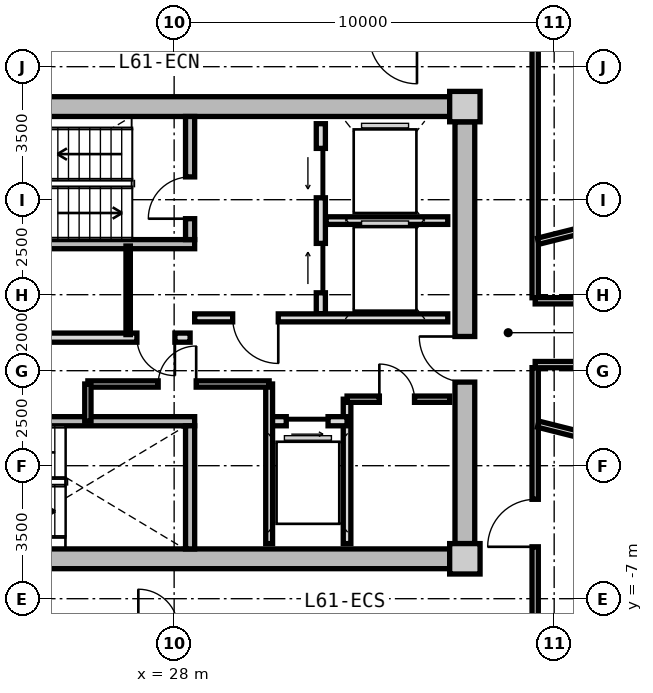
"""IFC4 building model, lengths in metres.
Left out: names, types, materials, properties, quantities, classifications, styles, units other than length and angle.
Written with IfcOpenShell. Run it as: python <this file> out.ifc"""

import sys

from ifc_helpers import new_model, si_unit, direction, frame, frame_2d, origin, origin_2d, place, context, subcontext, project, spatial, rectangle, extrude, source, transform, mapped, element, fill, save


model = new_model("IFC4")
c1 = context("Model", 3, precision=1e-05, world=origin(), true_north=direction((0.0, 1.0)))
c2 = subcontext(c1, "Body", "Model", "MODEL_VIEW")
j1 = project(units=[si_unit("LENGTHUNIT", "METRE"), si_unit("PLANEANGLEUNIT", "RADIAN")], contexts=[c1])
p1 = place(None, origin())
s1 = spatial("IfcSite", under=j1, at=p1, CompositionType="ELEMENT")
p2 = place(p1, origin())
s2 = spatial("IfcBuilding", under=s1, at=p2, CompositionType="ELEMENT")
p3 = place(p2, frame((0.0, 0.0, 196.75)))
s3 = spatial("IfcBuildingStorey", under=s2, at=p3, CompositionType="ELEMENT", Elevation=196.75)
m1 = source(origin(), c2, "Body", "SweptSolid", [
    extrude(rectangle(XDim=0.8, YDim=0.8, at=origin_2d()), origin(), (0.0, 0.0, 1.0), 3.05),
])
for number, where, z_axis, x_axis in (
    (1, (35.65, -5.95, 0.0), (0.0, 0.0, 1.0), (1.0, 0.0, 0.0)),
    (2, (35.65, 5.95, 0.0), (0.0, 0.0, 1.0), (1.0, 0.0, 0.0)),
):
    element("IfcColumn", number, at=place(p3, frame(where, z_axis=z_axis, x_axis=x_axis)), inside=s3, PredefinedType="COLUMN", context=c2, shape_type="MappedRepresentation", body=[
        mapped(m1, transform((0.0, 0.0, 0.0), x_axis=(1.0, 0.0, 0.0), y_axis=(0.0, 1.0, 0.0), z_axis=(0.0, 0.0, 1.0), scale=1.0)),
    ])
m2 = source(origin(), c2, "Body", "SweptSolid", [
    extrude(rectangle(XDim=14.5, YDim=0.52, at=frame_2d((7.25, 0.0))), origin(), (0.0, 0.0, 1.0), 2.76),
])
for number, where, z_axis, x_axis in (
    (3, (20.75, 5.95, 0.0), (0.0, 0.0, 1.0), (1.0, 0.0, 0.0)),
    (4, (35.25, -5.95, 0.0), (0.0, 0.0, 1.0), (-1.0, 0.0, 0.0)),
):
    element("IfcWall", number, at=place(p3, frame(where, z_axis=z_axis, x_axis=x_axis)), inside=s3, PredefinedType="SHEAR", context=c2, shape_type="MappedRepresentation", body=[
        mapped(m2, transform((0.0, 0.0, 0.0), x_axis=(1.0, 0.0, 0.0), y_axis=(0.0, 1.0, 0.0), z_axis=(0.0, 0.0, 1.0), scale=1.0)),
    ])
m3 = source(origin(), c2, "Body", "SweptSolid", [
    extrude(rectangle(XDim=11.1, YDim=0.52, at=frame_2d((5.55, 0.0))), origin(), (0.0, 0.0, 1.0), 2.76),
])
p4 = place(p3, frame((35.65, 5.55, 0.0), z_axis=(0.0, 0.0, 1.0), x_axis=(0.0, -1.0, 0.0)))
e5 = element("IfcWall", 5, at=p4, inside=s3, PredefinedType="SHEAR", context=c2, shape_type="MappedRepresentation", body=[
    mapped(m3, transform((0.0, 0.0, 0.0), x_axis=(1.0, 0.0, 0.0), y_axis=(0.0, 1.0, 0.0), z_axis=(0.0, 0.0, 1.0), scale=1.0)),
])
p5 = place(p4, frame((5.65, 0.0, 0.0)))
e6 = element("IfcOpeningElement", 6, at=p5, cuts=e5, PredefinedType="OPENING", context=c2, shape_type="SweptSolid", body=[
    extrude(rectangle(XDim=1.2, YDim=2.15, at=frame_2d((0.6, 1.075))), frame((0.0, 0.27, 0.0), z_axis=(0.0, -1.0, 0.0), x_axis=(1.0, 0.0, 0.0)), (0.0, 0.0, 1.0), 0.54),
])
m4 = source(origin(), c2, "Body", "SweptSolid", [
    extrude(rectangle(XDim=7.93, YDim=0.24, at=frame_2d((3.965, 0.0))), origin(), (0.0, 0.0, 1.0), 2.76),
])
p6 = place(p3, frame((20.61, 2.33, 0.0), z_axis=(0.0, 0.0, 1.0), x_axis=(1.0, 0.0, 0.0)))
e7 = element("IfcWall", 7, at=p6, inside=s3, PredefinedType="PARTITIONING", context=c2, shape_type="MappedRepresentation", body=[
    mapped(m4, transform((0.0, 0.0, 0.0), x_axis=(1.0, 0.0, 0.0), y_axis=(0.0, 1.0, 0.0), z_axis=(0.0, 0.0, 1.0), scale=1.0)),
])
m5 = source(origin(), c2, "Body", "SweptSolid", [
    extrude(rectangle(XDim=3.24, YDim=0.24, at=frame_2d((1.62, 0.0))), origin(), (0.0, 0.0, 1.0), 2.76),
])
p7 = place(p3, frame((28.42, 2.45, 0.0), z_axis=(0.0, 0.0, 1.0), x_axis=(0.0, 1.0, 0.0)))
e8 = element("IfcWall", 8, at=p7, inside=s3, PredefinedType="PARTITIONING", context=c2, shape_type="MappedRepresentation", body=[
    mapped(m5, transform((0.0, 0.0, 0.0), x_axis=(1.0, 0.0, 0.0), y_axis=(0.0, 1.0, 0.0), z_axis=(0.0, 0.0, 1.0), scale=1.0)),
])
p8 = place(p7, frame((0.55, 0.0, 0.0)))
e9 = element("IfcOpeningElement", 9, at=p8, cuts=e8, PredefinedType="OPENING", context=c2, shape_type="SweptSolid", body=[
    extrude(rectangle(XDim=1.1, YDim=2.15, at=frame_2d((0.55, 1.075))), frame((0.0, 0.13, 0.0), z_axis=(0.0, -1.0, 0.0), x_axis=(1.0, 0.0, 0.0)), (0.0, 0.0, 1.0), 0.26),
])
p9 = place(p3, frame((20.61, -2.33, 0.0), z_axis=(0.0, 0.0, 1.0), x_axis=(1.0, 0.0, 0.0)))
e10 = element("IfcWall", 10, at=p9, inside=s3, PredefinedType="PARTITIONING", context=c2, shape_type="MappedRepresentation", body=[
    mapped(m4, transform((0.0, 0.0, 0.0), x_axis=(1.0, 0.0, 0.0), y_axis=(0.0, 1.0, 0.0), z_axis=(0.0, 0.0, 1.0), scale=1.0)),
])
p10 = place(p9, frame((1.05, 0.0, 0.0)))
e11 = element("IfcOpeningElement", 11, at=p10, cuts=e10, PredefinedType="OPENING", context=c2, shape_type="SweptSolid", body=[
    extrude(rectangle(XDim=1.1, YDim=2.15, at=frame_2d((0.55, 1.075))), frame((0.0, 0.13, 0.0), z_axis=(0.0, -1.0, 0.0), x_axis=(1.0, 0.0, 0.0)), (0.0, 0.0, 1.0), 0.26),
])
p11 = place(p3, frame((28.42, -5.69, 0.0), z_axis=(0.0, 0.0, 1.0), x_axis=(0.0, 1.0, 0.0)))
e12 = element("IfcWall", 12, at=p11, inside=s3, PredefinedType="PARTITIONING", context=c2, shape_type="MappedRepresentation", body=[
    mapped(m5, transform((0.0, 0.0, 0.0), x_axis=(1.0, 0.0, 0.0), y_axis=(0.0, 1.0, 0.0), z_axis=(0.0, 0.0, 1.0), scale=1.0)),
])
m6 = source(origin(), c2, "Body", "SweptSolid", [
    extrude(rectangle(XDim=5.0, YDim=0.24, at=frame_2d((2.5, 0.0))), origin(), (0.0, 0.0, 1.0), 2.745),
])
p12 = place(p3, frame((31.86, 0.5, 0.0), z_axis=(0.0, 0.0, 1.0), x_axis=(0.0, 1.0, 0.0)))
e13 = element("IfcWall", 13, at=p12, inside=s3, PredefinedType="PARTITIONING", context=c2, shape_type="MappedRepresentation", body=[
    mapped(m6, transform((0.0, 0.0, 0.0), x_axis=(1.0, 0.0, 0.0), y_axis=(0.0, 1.0, 0.0), z_axis=(0.0, 0.0, 1.0), scale=1.0)),
])
p13 = place(p12, frame((3.05, 0.0, 0.0)))
e14 = element("IfcOpeningElement", 14, at=p13, cuts=e13, PredefinedType="OPENING", context=c2, shape_type="SweptSolid", body=[
    extrude(rectangle(XDim=1.3, YDim=2.2, at=frame_2d((0.65, 1.1))), frame((0.0, 0.13, 0.0), z_axis=(0.0, -1.0, 0.0), x_axis=(1.0, 0.0, 0.0)), (0.0, 0.0, 1.0), 0.26),
])
p14 = place(p12, frame((0.55, 0.0, 0.0)))
e15 = element("IfcOpeningElement", 15, at=p14, cuts=e13, PredefinedType="OPENING", context=c2, shape_type="SweptSolid", body=[
    extrude(rectangle(XDim=1.3, YDim=2.2, at=frame_2d((0.65, 1.1))), frame((0.0, 0.13, 0.0), z_axis=(0.0, -1.0, 0.0), x_axis=(1.0, 0.0, 0.0)), (0.0, 0.0, 1.0), 0.26),
])
m7 = source(origin(), c2, "Body", "SweptSolid", [
    extrude(rectangle(XDim=3.2, YDim=0.2, at=frame_2d((1.6, 0.0))), origin(), (0.0, 0.0, 1.0), 2.745),
])
p15 = place(p3, frame((32.0, 2.95, 0.0), z_axis=(0.0, 0.0, 1.0), x_axis=(1.0, 0.0, 0.0)))
e16 = element("IfcWall", 16, at=p15, inside=s3, PredefinedType="PARTITIONING", context=c2, shape_type="MappedRepresentation", body=[
    mapped(m7, transform((0.0, 0.0, 0.0), x_axis=(1.0, 0.0, 0.0), y_axis=(0.0, 1.0, 0.0), z_axis=(0.0, 0.0, 1.0), scale=1.0)),
])
m8 = source(origin(), c2, "Body", "SweptSolid", [
    extrude(rectangle(XDim=6.66, YDim=0.21, at=frame_2d((3.33, 0.0))), origin(), (0.0, 0.0, 1.0), 2.745),
])
p16 = place(p3, frame((28.54, 0.39, 0.0), z_axis=(0.0, 0.0, 1.0), x_axis=(1.0, 0.0, 0.0)))
e17 = element("IfcWall", 17, at=p16, inside=s3, PredefinedType="PARTITIONING", context=c2, shape_type="MappedRepresentation", body=[
    mapped(m8, transform((0.0, 0.0, 0.0), x_axis=(1.0, 0.0, 0.0), y_axis=(0.0, 1.0, 0.0), z_axis=(0.0, 0.0, 1.0), scale=1.0)),
])
p17 = place(p16, frame((1.0, 0.0, 0.0)))
e18 = element("IfcOpeningElement", 18, at=p17, cuts=e17, PredefinedType="OPENING", context=c2, shape_type="SweptSolid", body=[
    extrude(rectangle(XDim=1.2, YDim=2.15, at=frame_2d((0.6, 1.075))), frame((0.0, 0.115, 0.0), z_axis=(0.0, -1.0, 0.0), x_axis=(1.0, 0.0, 0.0)), (0.0, 0.0, 1.0), 0.23),
])
m9 = source(origin(), c2, "Body", "SweptSolid", [
    extrude(rectangle(XDim=7.62, YDim=0.24, at=frame_2d((3.81, 0.0))), origin(), (0.0, 0.0, 1.0), 2.745),
])
p18 = place(p3, frame((20.8, -0.13, 0.0), z_axis=(0.0, 0.0, 1.0), x_axis=(1.0, 0.0, 0.0)))
e19 = element("IfcWall", 19, at=p18, inside=s3, PredefinedType="PARTITIONING", context=c2, shape_type="MappedRepresentation", body=[
    mapped(m9, transform((0.0, 0.0, 0.0), x_axis=(1.0, 0.0, 0.0), y_axis=(0.0, 1.0, 0.0), z_axis=(0.0, 0.0, 1.0), scale=1.0)),
])
p19 = place(p18, frame((6.22, 0.0, 0.0)))
e20 = element("IfcOpeningElement", 20, at=p19, cuts=e19, PredefinedType="OPENING", context=c2, shape_type="SweptSolid", body=[
    extrude(rectangle(XDim=1.0, YDim=2.1, at=frame_2d((0.5, 1.05))), frame((0.0, 0.13, 0.0), z_axis=(0.0, -1.0, 0.0), x_axis=(1.0, 0.0, 0.0)), (0.0, 0.0, 1.0), 0.26),
])
p20 = place(p18, frame((2.4, 0.0, 0.0)))
e21 = element("IfcOpeningElement", 21, at=p20, cuts=e19, PredefinedType="OPENING", context=c2, shape_type="SweptSolid", body=[
    extrude(rectangle(XDim=1.0, YDim=2.1, at=frame_2d((0.5, 1.05))), frame((0.0, 0.13, 0.0), z_axis=(0.0, -1.0, 0.0), x_axis=(1.0, 0.0, 0.0)), (0.0, 0.0, 1.0), 0.26),
])
m10 = source(origin(), c2, "Body", "SweptSolid", [
    extrude(rectangle(XDim=2.33, YDim=0.115, at=frame_2d((1.165, 0.0))), origin(), (0.0, 0.0, 1.0), 2.745),
])
p21 = place(p3, frame((26.79, -0.05, 0.0), z_axis=(0.0, 0.0, 1.0), x_axis=(0.0, 1.0, 0.0)))
e22 = element("IfcWall", 22, at=p21, inside=s3, PredefinedType="PARTITIONING", context=c2, shape_type="MappedRepresentation", body=[
    mapped(m10, transform((0.0, 0.0, 0.0), x_axis=(1.0, 0.0, 0.0), y_axis=(0.0, 1.0, 0.0), z_axis=(0.0, 0.0, 1.0), scale=1.0)),
])
m11 = source(origin(), c2, "Body", "SweptSolid", [
    extrude(rectangle(XDim=3.8, YDim=0.2, at=frame_2d((1.9, 0.0))), origin(), (0.0, 0.0, 1.0), 2.745),
])
p22 = place(p3, frame((32.55, -5.55, 0.0), z_axis=(0.0, 0.0, 1.0), x_axis=(0.0, 1.0, 0.0)))
e23 = element("IfcWall", 23, at=p22, inside=s3, PredefinedType="PARTITIONING", context=c2, shape_type="MappedRepresentation", body=[
    mapped(m11, transform((0.0, 0.0, 0.0), x_axis=(1.0, 0.0, 0.0), y_axis=(0.0, 1.0, 0.0), z_axis=(0.0, 0.0, 1.0), scale=1.0)),
])
m12 = source(origin(), c2, "Body", "SweptSolid", [
    extrude(rectangle(XDim=2.05, YDim=0.24, at=frame_2d((1.025, 0.0))), origin(), (0.0, 0.0, 1.0), 2.745),
])
p23 = place(p3, frame((30.5, -2.33, 0.0), z_axis=(0.0, 0.0, 1.0), x_axis=(1.0, 0.0, 0.0)))
e24 = element("IfcWall", 24, at=p23, inside=s3, PredefinedType="PARTITIONING", context=c2, shape_type="MappedRepresentation", body=[
    mapped(m12, transform((0.0, 0.0, 0.0), x_axis=(1.0, 0.0, 0.0), y_axis=(0.0, 1.0, 0.0), z_axis=(0.0, 0.0, 1.0), scale=1.0)),
])
p24 = place(p23, frame((0.45, 0.0, 0.0)))
e25 = element("IfcOpeningElement", 25, at=p24, cuts=e24, PredefinedType="OPENING", context=c2, shape_type="SweptSolid", body=[
    extrude(rectangle(XDim=1.1, YDim=2.2, at=frame_2d((0.55, 1.1))), frame((0.0, 0.13, 0.0), z_axis=(0.0, -1.0, 0.0), x_axis=(1.0, 0.0, 0.0)), (0.0, 0.0, 1.0), 0.26),
])
m13 = source(origin(), c2, "Body", "SweptSolid", [
    extrude(rectangle(XDim=4.2, YDim=0.18, at=frame_2d((2.1, 0.0))), origin(), (0.0, 0.0, 1.0), 2.745),
])
p25 = place(p3, frame((30.5, -5.55, 0.0), z_axis=(0.0, 0.0, 1.0), x_axis=(0.0, 1.0, 0.0)))
e26 = element("IfcWall", 26, at=p25, inside=s3, PredefinedType="PARTITIONING", context=c2, shape_type="MappedRepresentation", body=[
    mapped(m13, transform((0.0, 0.0, 0.0), x_axis=(1.0, 0.0, 0.0), y_axis=(0.0, 1.0, 0.0), z_axis=(0.0, 0.0, 1.0), scale=1.0)),
])
m14 = source(origin(), c2, "Body", "SweptSolid", [
    extrude(rectangle(XDim=4.77, YDim=0.165, at=frame_2d((2.385, 0.0))), origin(), (0.0, 0.0, 1.0), 2.745),
])
p26 = place(p3, frame((25.73, -1.35, 0.0), z_axis=(0.0, 0.0, 1.0), x_axis=(1.0, 0.0, 0.0)))
e27 = element("IfcWall", 27, at=p26, inside=s3, PredefinedType="PARTITIONING", context=c2, shape_type="MappedRepresentation", body=[
    mapped(m14, transform((0.0, 0.0, 0.0), x_axis=(1.0, 0.0, 0.0), y_axis=(0.0, 1.0, 0.0), z_axis=(0.0, 0.0, 1.0), scale=1.0)),
])
p27 = place(p26, frame((1.85, 0.0, 0.0)))
e28 = element("IfcOpeningElement", 28, at=p27, cuts=e27, PredefinedType="OPENING", context=c2, shape_type="SweptSolid", body=[
    extrude(rectangle(XDim=1.0, YDim=2.1, at=frame_2d((0.5, 1.05))), frame((0.0, 0.093, 0.0), z_axis=(0.0, -1.0, 0.0), x_axis=(1.0, 0.0, 0.0)), (0.0, 0.0, 1.0), 0.185),
])
m15 = source(origin(), c2, "Body", "SweptSolid", [
    extrude(rectangle(XDim=0.98, YDim=0.165, at=frame_2d((0.49, 0.0))), origin(), (0.0, 0.0, 1.0), 2.745),
])
p28 = place(p3, frame((25.73, -2.33, 0.0), z_axis=(0.0, 0.0, 1.0), x_axis=(0.0, 1.0, 0.0)))
e29 = element("IfcWall", 29, at=p28, inside=s3, PredefinedType="PARTITIONING", context=c2, shape_type="MappedRepresentation", body=[
    mapped(m15, transform((0.0, 0.0, 0.0), x_axis=(1.0, 0.0, 0.0), y_axis=(0.0, 1.0, 0.0), z_axis=(0.0, 0.0, 1.0), scale=1.0)),
])
m16 = source(origin(), c2, "Body", "SweptSolid", [
    extrude(rectangle(XDim=2.7, YDim=0.165, at=frame_2d((1.35, 0.0))), origin(), (0.0, 0.0, 1.0), 2.745),
])
p29 = place(p3, frame((32.55, -1.75, 0.0), z_axis=(0.0, 0.0, 1.0), x_axis=(1.0, 0.0, 0.0)))
e30 = element("IfcWall", 30, at=p29, inside=s3, PredefinedType="PARTITIONING", context=c2, shape_type="MappedRepresentation", body=[
    mapped(m16, transform((0.0, 0.0, 0.0), x_axis=(1.0, 0.0, 0.0), y_axis=(0.0, 1.0, 0.0), z_axis=(0.0, 0.0, 1.0), scale=1.0)),
])
p30 = place(p29, frame((0.85, 0.0, 0.0)))
e31 = element("IfcOpeningElement", 31, at=p30, cuts=e30, PredefinedType="OPENING", context=c2, shape_type="SweptSolid", body=[
    extrude(rectangle(XDim=0.925, YDim=2.1, at=frame_2d((0.462, 1.05))), frame((0.0, 0.093, 0.0), z_axis=(0.0, -1.0, 0.0), x_axis=(1.0, 0.0, 0.0)), (0.0, 0.0, 1.0), 0.185),
])
m17 = source(origin(), c2, "Body", "SweptSolid", [
    extrude(rectangle(XDim=6.88, YDim=0.165, at=frame_2d((3.44, 0.0))), origin(), (0.0, 0.0, 1.0), 2.745),
])
p31 = place(p3, frame((37.5, 7.8, 0.0), z_axis=(0.0, 0.0, 1.0), x_axis=(0.0, -1.0, 0.0)))
e32 = element("IfcWall", 32, at=p31, inside=s3, PredefinedType="PARTITIONING", context=c2, shape_type="MappedRepresentation", body=[
    mapped(m17, transform((0.0, 0.0, 0.0), x_axis=(1.0, 0.0, 0.0), y_axis=(0.0, 1.0, 0.0), z_axis=(0.0, 0.0, 1.0), scale=1.0)),
])
p32 = place(p3, frame((37.5, -0.92, 0.0), z_axis=(0.0, 0.0, 1.0), x_axis=(0.0, -1.0, 0.0)))
e33 = element("IfcWall", 33, at=p32, inside=s3, PredefinedType="PARTITIONING", context=c2, shape_type="MappedRepresentation", body=[
    mapped(m17, transform((0.0, 0.0, 0.0), x_axis=(1.0, 0.0, 0.0), y_axis=(0.0, 1.0, 0.0), z_axis=(0.0, 0.0, 1.0), scale=1.0)),
])
p33 = place(p32, frame((3.464, 0.0, 0.0)))
e34 = element("IfcOpeningElement", 34, at=p33, cuts=e33, PredefinedType="OPENING", context=c2, shape_type="SweptSolid", body=[
    extrude(rectangle(XDim=1.25, YDim=2.2, at=frame_2d((0.625, 1.1))), frame((0.0, 0.093, 0.0), z_axis=(0.0, -1.0, 0.0), x_axis=(1.0, 0.0, 0.0)), (0.0, 0.0, 1.0), 0.185),
])
m18 = source(origin(), c2, "Body", "SweptSolid", [
    extrude(rectangle(XDim=6.157, YDim=0.165, at=frame_2d((3.079, 0.0))), origin(), (0.0, 0.0, 1.0), 2.345),
])
for number, where, z_axis, x_axis in (
    (35, (37.58, -2.407, 0.0), (0.0, 0.0, 1.0), (0.97, -0.244, 0.0)),
    (36, (37.58, 2.407, 0.0), (0.0, 0.0, 1.0), (0.97, 0.244, 0.0)),
):
    element("IfcWall", number, at=place(p3, frame(where, z_axis=z_axis, x_axis=x_axis)), inside=s3, PredefinedType="PARTITIONING", context=c2, shape_type="MappedRepresentation", body=[
        mapped(m18, transform((0.0, 0.0, 0.0), x_axis=(1.0, 0.0, 0.0), y_axis=(0.0, 1.0, 0.0), z_axis=(0.0, 0.0, 1.0), scale=1.0)),
    ])
m19 = source(origin(), c2, "Body", "SweptSolid", [
    extrude(rectangle(XDim=6.101, YDim=0.165, at=frame_2d((3.051, 0.0))), origin(), (0.0, 0.0, 1.0), 2.745),
])
p34 = place(p3, frame((37.5, 0.84, 0.0), z_axis=(0.0, 0.0, 1.0), x_axis=(1.0, 0.0, 0.0)))
e37 = element("IfcWall", 37, at=p34, inside=s3, PredefinedType="PARTITIONING", context=c2, shape_type="MappedRepresentation", body=[
    mapped(m19, transform((0.0, 0.0, 0.0), x_axis=(1.0, 0.0, 0.0), y_axis=(0.0, 1.0, 0.0), z_axis=(0.0, 0.0, 1.0), scale=1.0)),
])
p35 = place(p34, frame((2.576, 0.0, 0.0)))
e38 = element("IfcOpeningElement", 38, at=p35, cuts=e37, PredefinedType="OPENING", context=c2, shape_type="SweptSolid", body=[
    extrude(rectangle(XDim=0.95, YDim=2.1, at=frame_2d((0.475, 1.05))), frame((0.0, 0.093, 0.0), z_axis=(0.0, -1.0, 0.0), x_axis=(1.0, 0.0, 0.0)), (0.0, 0.0, 1.0), 0.185),
])
p36 = place(p3, frame((43.601, -0.84, 0.0), z_axis=(0.0, 0.0, 1.0), x_axis=(-1.0, 0.0, 0.0)))
e39 = element("IfcWall", 39, at=p36, inside=s3, PredefinedType="PARTITIONING", context=c2, shape_type="MappedRepresentation", body=[
    mapped(m19, transform((0.0, 0.0, 0.0), x_axis=(1.0, 0.0, 0.0), y_axis=(0.0, 1.0, 0.0), z_axis=(0.0, 0.0, 1.0), scale=1.0)),
])
p37 = place(p36, frame((2.576, 0.0, 0.0)))
e40 = element("IfcOpeningElement", 40, at=p37, cuts=e39, PredefinedType="OPENING", context=c2, shape_type="SweptSolid", body=[
    extrude(rectangle(XDim=0.95, YDim=2.1, at=frame_2d((0.475, 1.05))), frame((0.0, 0.093, 0.0), z_axis=(0.0, -1.0, 0.0), x_axis=(1.0, 0.0, 0.0)), (0.0, 0.0, 1.0), 0.185),
])
m20 = source(origin(), c2, "Body", "SweptSolid", [
    extrude(rectangle(XDim=1.1, YDim=2.15, at=frame_2d((0.55, 1.075))), frame((0.0, 0.025, 0.0), z_axis=(0.0, -1.0, 0.0), x_axis=(1.0, 0.0, 0.0)), (0.0, 0.0, 1.0), 0.05),
])
p38 = place(p8, origin())
e41 = element("IfcDoor", 41, at=p38, inside=s3, OperationType="SINGLE_SWING_LEFT", PredefinedType="DOOR", context=c2, shape_type="MappedRepresentation", body=[
    mapped(m20, transform((0.0, 0.0, 0.0), x_axis=(1.0, 0.0, 0.0), y_axis=(0.0, 1.0, 0.0), z_axis=(0.0, 0.0, 1.0), scale=1.0)),
])
fill(e9, e41)
m21 = source(origin(), c2, "Body", "SweptSolid", [
    extrude(rectangle(XDim=1.3, YDim=2.2, at=frame_2d((0.65, 1.1))), frame((0.0, 0.025, 0.0), z_axis=(0.0, -1.0, 0.0), x_axis=(1.0, 0.0, 0.0)), (0.0, 0.0, 1.0), 0.05),
])
p39 = place(p13, origin())
e42 = element("IfcDoor", 42, at=p39, inside=s3, OperationType="SLIDING_TO_LEFT", PredefinedType="DOOR", context=c2, shape_type="MappedRepresentation", body=[
    mapped(m21, transform((0.0, 0.0, 0.0), x_axis=(1.0, 0.0, 0.0), y_axis=(0.0, 1.0, 0.0), z_axis=(0.0, 0.0, 1.0), scale=1.0)),
])
fill(e14, e42)
p40 = place(p14, origin())
e43 = element("IfcDoor", 43, at=p40, inside=s3, OperationType="SLIDING_TO_RIGHT", PredefinedType="DOOR", context=c2, shape_type="MappedRepresentation", body=[
    mapped(m21, transform((0.0, 0.0, 0.0), x_axis=(1.0, 0.0, 0.0), y_axis=(0.0, 1.0, 0.0), z_axis=(0.0, 0.0, 1.0), scale=1.0)),
])
fill(e15, e43)
m22 = source(origin(), c2, "Body", "SweptSolid", [
    extrude(rectangle(XDim=1.2, YDim=2.15, at=frame_2d((0.6, 1.075))), frame((0.0, 0.025, 0.0), z_axis=(0.0, -1.0, 0.0), x_axis=(1.0, 0.0, 0.0)), (0.0, 0.0, 1.0), 0.05),
])
p41 = place(p17, frame((1.2, 0.0, 0.0), z_axis=(0.0, 0.0, 1.0), x_axis=(-1.0, 0.0, 0.0)))
e44 = element("IfcDoor", 44, at=p41, inside=s3, OperationType="SINGLE_SWING_LEFT", PredefinedType="DOOR", context=c2, shape_type="MappedRepresentation", body=[
    mapped(m22, transform((0.0, 0.0, 0.0), x_axis=(1.0, 0.0, 0.0), y_axis=(0.0, 1.0, 0.0), z_axis=(0.0, 0.0, 1.0), scale=1.0)),
])
fill(e18, e44)
p42 = place(p5, frame((1.2, 0.0, 0.0), z_axis=(0.0, 0.0, 1.0), x_axis=(-1.0, 0.0, 0.0)))
e45 = element("IfcDoor", 45, at=p42, inside=s3, OperationType="SINGLE_SWING_RIGHT", PredefinedType="DOOR", context=c2, shape_type="MappedRepresentation", body=[
    mapped(m22, transform((0.0, 0.0, 0.0), x_axis=(1.0, 0.0, 0.0), y_axis=(0.0, 1.0, 0.0), z_axis=(0.0, 0.0, 1.0), scale=1.0)),
])
fill(e6, e45)
m23 = source(origin(), c2, "Body", "SweptSolid", [
    extrude(rectangle(XDim=1.0, YDim=2.1, at=frame_2d((0.5, 1.05))), frame((0.0, 0.025, 0.0), z_axis=(0.0, -1.0, 0.0), x_axis=(1.0, 0.0, 0.0)), (0.0, 0.0, 1.0), 0.05),
])
p43 = place(p19, frame((1.0, 0.0, 0.0), z_axis=(0.0, 0.0, 1.0), x_axis=(-1.0, 0.0, 0.0)))
e46 = element("IfcDoor", 46, at=p43, inside=s3, OperationType="SINGLE_SWING_LEFT", PredefinedType="DOOR", context=c2, shape_type="MappedRepresentation", body=[
    mapped(m23, transform((0.0, 0.0, 0.0), x_axis=(1.0, 0.0, 0.0), y_axis=(0.0, 1.0, 0.0), z_axis=(0.0, 0.0, 1.0), scale=1.0)),
])
fill(e20, e46)
m24 = source(origin(), c2, "Body", "SweptSolid", [
    extrude(rectangle(XDim=1.1, YDim=2.2, at=frame_2d((0.55, 1.1))), frame((0.0, 0.025, 0.0), z_axis=(0.0, -1.0, 0.0), x_axis=(1.0, 0.0, 0.0)), (0.0, 0.0, 1.0), 0.05),
])
p44 = place(p24, frame((1.1, 0.0, 0.0), z_axis=(0.0, 0.0, 1.0), x_axis=(-1.0, 0.0, 0.0)))
e47 = element("IfcDoor", 47, at=p44, inside=s3, OperationType="SLIDING_TO_RIGHT", PredefinedType="DOOR", context=c2, shape_type="MappedRepresentation", body=[
    mapped(m24, transform((0.0, 0.0, 0.0), x_axis=(1.0, 0.0, 0.0), y_axis=(0.0, 1.0, 0.0), z_axis=(0.0, 0.0, 1.0), scale=1.0)),
])
fill(e25, e47)
p45 = place(p27, origin())
e48 = element("IfcDoor", 48, at=p45, inside=s3, OperationType="SINGLE_SWING_RIGHT", PredefinedType="DOOR", context=c2, shape_type="MappedRepresentation", body=[
    mapped(m23, transform((0.0, 0.0, 0.0), x_axis=(1.0, 0.0, 0.0), y_axis=(0.0, 1.0, 0.0), z_axis=(0.0, 0.0, 1.0), scale=1.0)),
])
fill(e28, e48)
m25 = source(origin(), c2, "Body", "SweptSolid", [
    extrude(rectangle(XDim=0.925, YDim=2.1, at=frame_2d((0.462, 1.05))), frame((0.0, 0.025, 0.0), z_axis=(0.0, -1.0, 0.0), x_axis=(1.0, 0.0, 0.0)), (0.0, 0.0, 1.0), 0.05),
])
p46 = place(p30, origin())
e49 = element("IfcDoor", 49, at=p46, inside=s3, OperationType="SINGLE_SWING_LEFT", PredefinedType="DOOR", context=c2, shape_type="MappedRepresentation", body=[
    mapped(m25, transform((0.0, 0.0, 0.0), x_axis=(1.0, 0.0, 0.0), y_axis=(0.0, 1.0, 0.0), z_axis=(0.0, 0.0, 1.0), scale=1.0)),
])
fill(e31, e49)
m26 = source(origin(), c2, "Body", "SweptSolid", [
    extrude(rectangle(XDim=1.25, YDim=2.2, at=frame_2d((0.625, 1.1))), frame((0.0, 0.025, 0.0), z_axis=(0.0, -1.0, 0.0), x_axis=(1.0, 0.0, 0.0)), (0.0, 0.0, 1.0), 0.05),
])
p47 = place(p33, frame((1.25, 0.0, 0.0), z_axis=(0.0, 0.0, 1.0), x_axis=(-1.0, 0.0, 0.0)))
e50 = element("IfcDoor", 50, at=p47, inside=s3, OperationType="SINGLE_SWING_LEFT", PredefinedType="DOOR", context=c2, shape_type="MappedRepresentation", body=[
    mapped(m26, transform((0.0, 0.0, 0.0), x_axis=(1.0, 0.0, 0.0), y_axis=(0.0, 1.0, 0.0), z_axis=(0.0, 0.0, 1.0), scale=1.0)),
])
fill(e34, e50)
save(model, sys.argv[1])
